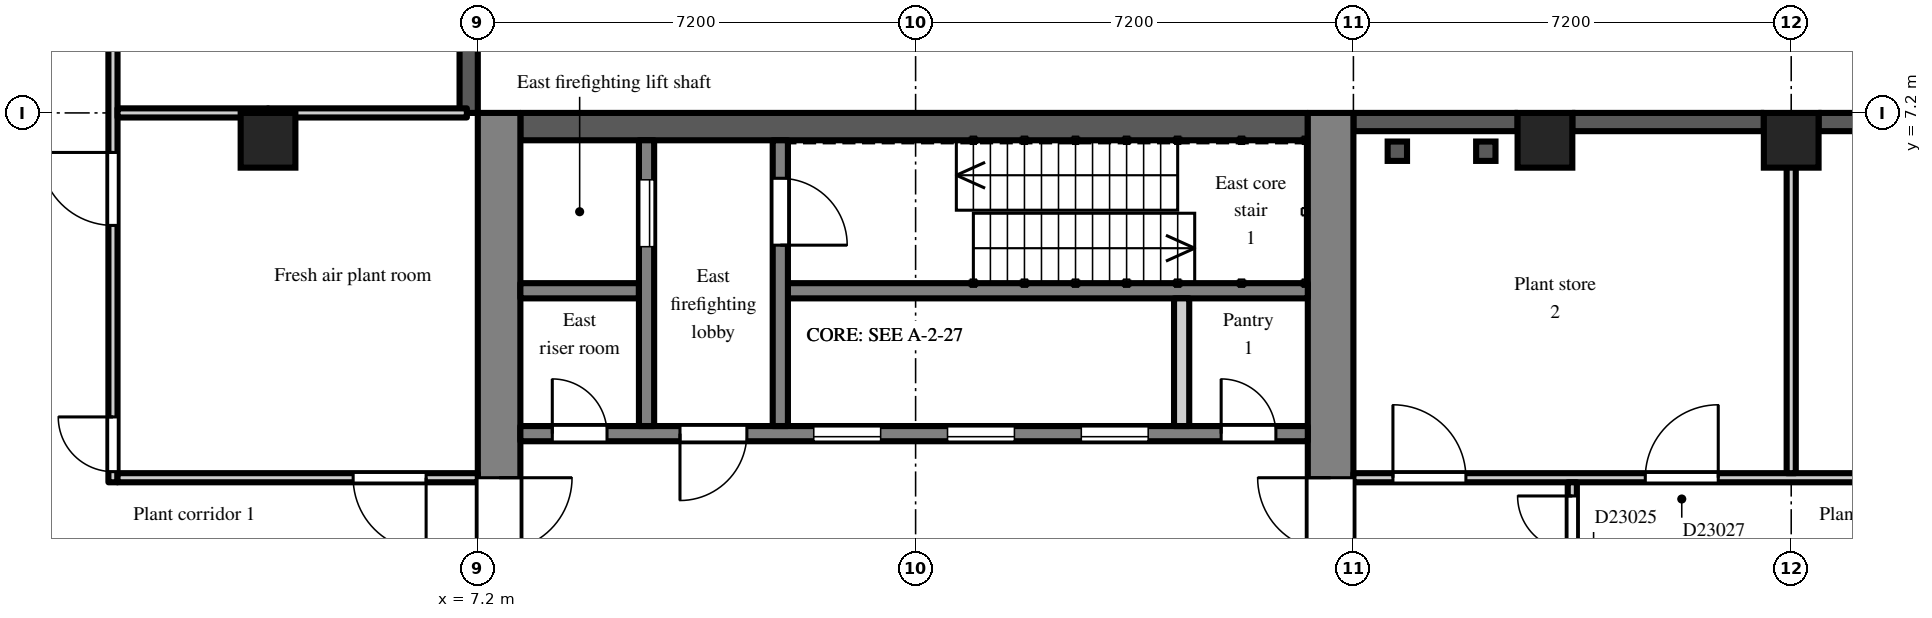
"""IFC4 building model, lengths in metres.
Left out: names, types, materials, properties, quantities, classifications, styles, units other than length and angle.
Written with IfcOpenShell. Run it as: python <this file> out.ifc"""

import sys

from ifc_helpers import new_model, si_unit, direction, frame, frame_2d, origin, origin_2d, place, context, subcontext, project, spatial, polyline, rectangle, outline, extrude, element, fill, save


model = new_model("IFC4")
c1 = context("Model", 3, precision=1e-05, world=origin(), true_north=direction((0.0, 1.0)))
c2 = subcontext(c1, "Body", "Model", "MODEL_VIEW")
j1 = project(units=[si_unit("LENGTHUNIT", "METRE"), si_unit("PLANEANGLEUNIT", "RADIAN")], contexts=[c1])
p1 = place(None, origin())
s1 = spatial("IfcSite", under=j1, at=p1, CompositionType="ELEMENT")
p2 = place(p1, origin())
s2 = spatial("IfcBuilding", under=s1, at=p2, CompositionType="ELEMENT")
p3 = place(p2, frame((0.0, 0.0, 162.3)))
s3 = spatial("IfcBuildingStorey", under=s2, at=p3, CompositionType="ELEMENT", Elevation=162.3)
for number, where, z_axis, x_axis in (
    (1, (3.75, 6.75, 0.0), (0.0, 0.0, 1.0), (1.0, 0.0, 0.0)),
    (2, (24.75, 6.75, 0.0), (0.0, 0.0, 1.0), (1.0, 0.0, 0.0)),
    (3, (28.8, 6.75, 0.0), (0.0, 0.0, 1.0), (1.0, 0.0, 0.0)),
):
    element("IfcColumn", number, at=place(p3, frame(where, z_axis=z_axis, x_axis=x_axis)), inside=s3, PredefinedType="COLUMN", context=c2, shape_type="SweptSolid", body=[
        extrude(rectangle(XDim=0.9, YDim=0.9, at=origin_2d()), origin(), (0.0, 0.0, 1.0), 4.2),
    ])
p4 = place(p3, frame((35.55, 7.05, 0.0), z_axis=(0.0, 0.0, 1.0), x_axis=(-1.0, 0.0, 0.0)))
e4 = element("IfcWall", 4, at=p4, inside=s3, PredefinedType="SOLIDWALL", context=c2, shape_type="SweptSolid", body=[
    extrude(outline(polyline([(0.0, 0.0), (6.3, 0.0), (6.3, 3.8), (5.152, 3.8), (5.15, 3.4), (4.35, 3.4), (4.348, 3.8), (0.0, 3.8), (0.0, 0.0)])), frame((0.0, 0.15, 0.0), z_axis=(0.0, -1.0, 0.0), x_axis=(1.0, 0.0, 0.0)), (0.0, 0.0, 1.0), 0.3),
])
p5 = place(p3, frame((28.35, 7.05, 0.0), z_axis=(0.0, 0.0, 1.0), x_axis=(-1.0, 0.0, 0.0)))
e5 = element("IfcWall", 5, at=p5, inside=s3, PredefinedType="SOLIDWALL", context=c2, shape_type="SweptSolid", body=[
    extrude(rectangle(XDim=3.15, YDim=0.3, at=frame_2d((1.575, 0.0))), origin(), (0.0, 0.0, 1.0), 3.8),
])
p6 = place(p3, frame((24.3, 7.05, 0.0), z_axis=(0.0, 0.0, 1.0), x_axis=(-1.0, 0.0, 0.0)))
e6 = element("IfcWall", 6, at=p6, inside=s3, PredefinedType="SOLIDWALL", context=c2, shape_type="SweptSolid", body=[
    extrude(rectangle(XDim=2.7, YDim=0.3, at=frame_2d((1.35, 0.0))), origin(), (0.0, 0.0, 1.0), 3.4),
])
p7 = place(p3, frame((7.05, 7.2, 0.0), z_axis=(0.0, 0.0, 1.0), x_axis=(0.0, 1.0, 0.0)))
e7 = element("IfcWall", 7, at=p7, inside=s3, PredefinedType="SOLIDWALL", context=c2, shape_type="SweptSolid", body=[
    extrude(rectangle(XDim=7.2, YDim=0.3, at=frame_2d((3.6, 0.0))), origin(), (0.0, 0.0, 1.0), 3.8),
])
p8 = place(p3, frame((7.55, -7.2, 0.0), z_axis=(0.0, 0.0, 1.0), x_axis=(0.0, 1.0, 0.0)))
e8 = element("IfcWall", 8, at=p8, inside=s3, PredefinedType="SHEAR", context=c2, shape_type="SweptSolid", body=[
    extrude(rectangle(XDim=14.4, YDim=0.7, at=frame_2d((7.2, 0.0))), origin(), (0.0, 0.0, 1.0), 3.8),
])
p9 = place(p8, frame((6.0, 0.0, 0.0)))
e9 = element("IfcOpeningElement", 9, at=p9, cuts=e8, PredefinedType="OPENING", context=c2, shape_type="SweptSolid", body=[
    extrude(rectangle(XDim=2.4, YDim=2.2, at=frame_2d((1.2, 1.1))), frame((0.0, 0.36, 0.0), z_axis=(0.0, -1.0, 0.0), x_axis=(1.0, 0.0, 0.0)), (0.0, 0.0, 1.0), 0.72),
])
p10 = place(p3, frame((21.225, -7.2, 0.0), z_axis=(0.0, 0.0, 1.0), x_axis=(0.0, 1.0, 0.0)))
e10 = element("IfcWall", 10, at=p10, inside=s3, PredefinedType="SHEAR", context=c2, shape_type="SweptSolid", body=[
    extrude(rectangle(XDim=14.4, YDim=0.75, at=frame_2d((7.2, 0.0))), origin(), (0.0, 0.0, 1.0), 3.8),
])
p11 = place(p10, frame((6.0, 0.0, 0.0)))
e11 = element("IfcOpeningElement", 11, at=p11, cuts=e10, PredefinedType="OPENING", context=c2, shape_type="SweptSolid", body=[
    extrude(rectangle(XDim=2.4, YDim=2.2, at=frame_2d((1.2, 1.1))), frame((0.0, 0.385, 0.0), z_axis=(0.0, -1.0, 0.0), x_axis=(1.0, 0.0, 0.0)), (0.0, 0.0, 1.0), 0.77),
])
p12 = place(p3, frame((7.9, 6.975, 0.0), z_axis=(0.0, 0.0, 1.0), x_axis=(1.0, 0.0, 0.0)))
e12 = element("IfcWall", 12, at=p12, inside=s3, PredefinedType="SHEAR", context=c2, shape_type="SweptSolid", body=[
    extrude(rectangle(XDim=12.95, YDim=0.45, at=frame_2d((6.475, 0.0))), origin(), (0.0, 0.0, 1.0), 3.8),
])
p13 = place(p3, frame((7.9, 1.925, 0.0), z_axis=(0.0, 0.0, 1.0), x_axis=(1.0, 0.0, 0.0)))
e13 = element("IfcWall", 13, at=p13, inside=s3, PredefinedType="SHEAR", context=c2, shape_type="SweptSolid", body=[
    extrude(rectangle(XDim=12.95, YDim=0.25, at=frame_2d((6.475, 0.0))), origin(), (0.0, 0.0, 1.0), 3.8),
])
p14 = place(p13, frame((4.825, 0.0, 0.0)))
e14 = element("IfcOpeningElement", 14, at=p14, cuts=e13, PredefinedType="OPENING", context=c2, shape_type="SweptSolid", body=[
    extrude(rectangle(XDim=1.1, YDim=2.1, at=frame_2d((0.55, 1.05))), frame((0.0, 0.135, 0.0), z_axis=(0.0, -1.0, 0.0), x_axis=(1.0, 0.0, 0.0)), (0.0, 0.0, 1.0), 0.27),
])
p15 = place(p13, frame((7.025, 0.0, 0.0)))
e15 = element("IfcOpeningElement", 15, at=p15, cuts=e13, PredefinedType="OPENING", context=c2, shape_type="SweptSolid", body=[
    extrude(rectangle(XDim=1.1, YDim=2.1, at=frame_2d((0.55, 1.05))), frame((0.0, 0.135, 0.0), z_axis=(0.0, -1.0, 0.0), x_axis=(1.0, 0.0, 0.0)), (0.0, 0.0, 1.0), 0.27),
])
p16 = place(p13, frame((9.225, 0.0, 0.0)))
e16 = element("IfcOpeningElement", 16, at=p16, cuts=e13, PredefinedType="OPENING", context=c2, shape_type="SweptSolid", body=[
    extrude(rectangle(XDim=1.1, YDim=2.1, at=frame_2d((0.55, 1.05))), frame((0.0, 0.135, 0.0), z_axis=(0.0, -1.0, 0.0), x_axis=(1.0, 0.0, 0.0)), (0.0, 0.0, 1.0), 0.27),
])
p17 = place(p13, frame((0.525, 0.0, 0.0)))
e17 = element("IfcOpeningElement", 17, at=p17, cuts=e13, PredefinedType="OPENING", context=c2, shape_type="SweptSolid", body=[
    extrude(rectangle(XDim=0.9, YDim=2.1, at=frame_2d((0.45, 1.05))), frame((0.0, 0.135, 0.0), z_axis=(0.0, -1.0, 0.0), x_axis=(1.0, 0.0, 0.0)), (0.0, 0.0, 1.0), 0.27),
])
p18 = place(p13, frame((2.625, 0.0, 0.0)))
e18 = element("IfcOpeningElement", 18, at=p18, cuts=e13, PredefinedType="OPENING", context=c2, shape_type="SweptSolid", body=[
    extrude(rectangle(XDim=1.1, YDim=2.1, at=frame_2d((0.55, 1.05))), frame((0.0, 0.135, 0.0), z_axis=(0.0, -1.0, 0.0), x_axis=(1.0, 0.0, 0.0)), (0.0, 0.0, 1.0), 0.27),
])
p19 = place(p13, frame((11.525, 0.0, 0.0)))
e19 = element("IfcOpeningElement", 19, at=p19, cuts=e13, PredefinedType="OPENING", context=c2, shape_type="SweptSolid", body=[
    extrude(rectangle(XDim=0.9, YDim=2.1, at=frame_2d((0.45, 1.05))), frame((0.0, 0.135, 0.0), z_axis=(0.0, -1.0, 0.0), x_axis=(1.0, 0.0, 0.0)), (0.0, 0.0, 1.0), 0.27),
])
p20 = place(p3, frame((7.9, 4.275, 0.0), z_axis=(0.0, 0.0, 1.0), x_axis=(1.0, 0.0, 0.0)))
e20 = element("IfcWall", 20, at=p20, inside=s3, PredefinedType="SHEAR", context=c2, shape_type="SweptSolid", body=[
    extrude(rectangle(XDim=1.95, YDim=0.25, at=frame_2d((0.975, 0.0))), origin(), (0.0, 0.0, 1.0), 3.8),
])
p21 = place(p3, frame((12.3, 4.275, 0.0), z_axis=(0.0, 0.0, 1.0), x_axis=(1.0, 0.0, 0.0)))
e21 = element("IfcWall", 21, at=p21, inside=s3, PredefinedType="SHEAR", context=c2, shape_type="SweptSolid", body=[
    extrude(rectangle(XDim=8.55, YDim=0.25, at=frame_2d((4.275, 0.0))), origin(), (0.0, 0.0, 1.0), 3.8),
])
p22 = place(p3, frame((9.975, 2.05, 0.0), z_axis=(0.0, 0.0, 1.0), x_axis=(0.0, 1.0, 0.0)))
e22 = element("IfcWall", 22, at=p22, inside=s3, PredefinedType="SHEAR", context=c2, shape_type="SweptSolid", body=[
    extrude(rectangle(XDim=4.7, YDim=0.25, at=frame_2d((2.35, 0.0))), origin(), (0.0, 0.0, 1.0), 3.8),
])
p23 = place(p22, frame((2.95, 0.0, 0.0)))
e23 = element("IfcOpeningElement", 23, at=p23, cuts=e22, PredefinedType="OPENING", context=c2, shape_type="SweptSolid", body=[
    extrude(rectangle(XDim=1.1, YDim=2.1, at=frame_2d((0.55, 1.05))), frame((0.0, 0.135, 0.0), z_axis=(0.0, -1.0, 0.0), x_axis=(1.0, 0.0, 0.0)), (0.0, 0.0, 1.0), 0.27),
])
p24 = place(p3, frame((12.175, 2.05, 0.0), z_axis=(0.0, 0.0, 1.0), x_axis=(0.0, 1.0, 0.0)))
e24 = element("IfcWall", 24, at=p24, inside=s3, PredefinedType="SHEAR", context=c2, shape_type="SweptSolid", body=[
    extrude(rectangle(XDim=4.7, YDim=0.25, at=frame_2d((2.35, 0.0))), origin(), (0.0, 0.0, 1.0), 3.8),
])
p25 = place(p24, frame((2.975, 0.0, 0.0)))
e25 = element("IfcOpeningElement", 25, at=p25, cuts=e24, PredefinedType="OPENING", context=c2, shape_type="SweptSolid", body=[
    extrude(rectangle(XDim=1.1, YDim=2.1, at=frame_2d((0.55, 1.05))), frame((0.0, 0.135, 0.0), z_axis=(0.0, -1.0, 0.0), x_axis=(1.0, 0.0, 0.0)), (0.0, 0.0, 1.0), 0.27),
])
p26 = place(p3, frame((18.775, 2.05, 0.0), z_axis=(0.0, 0.0, 1.0), x_axis=(0.0, 1.0, 0.0)))
e26 = element("IfcWall", 26, at=p26, inside=s3, PredefinedType="PARTITIONING", context=c2, shape_type="SweptSolid", body=[
    extrude(rectangle(XDim=2.1, YDim=0.25, at=frame_2d((1.05, 0.0))), origin(), (0.0, 0.0, 1.0), 3.8),
])
p27 = place(p3, frame((1.2, 1.125, 0.0), z_axis=(0.0, 0.0, 1.0), x_axis=(0.0, 1.0, 0.0)))
e27 = element("IfcWall", 27, at=p27, inside=s3, PredefinedType="PARTITIONING", context=c2, shape_type="SweptSolid", body=[
    extrude(rectangle(XDim=20.295, YDim=0.15, at=frame_2d((10.147, 0.0))), origin(), (0.0, 0.0, 1.0), 3.8),
])
p28 = place(p27, frame((0.175, 0.0, 0.0)))
e28 = element("IfcOpeningElement", 28, at=p28, cuts=e27, PredefinedType="OPENING", context=c2, shape_type="SweptSolid", body=[
    extrude(rectangle(XDim=0.9, YDim=2.1, at=frame_2d((0.45, 1.05))), frame((0.0, 0.085, 0.0), z_axis=(0.0, -1.0, 0.0), x_axis=(1.0, 0.0, 0.0)), (0.0, 0.0, 1.0), 0.17),
])
p29 = place(p27, frame((4.225, 0.0, 0.0)))
e29 = element("IfcOpeningElement", 29, at=p29, cuts=e27, PredefinedType="OPENING", context=c2, shape_type="SweptSolid", body=[
    extrude(rectangle(XDim=1.2, YDim=2.1, at=frame_2d((0.6, 1.05))), frame((0.0, 0.085, 0.0), z_axis=(0.0, -1.0, 0.0), x_axis=(1.0, 0.0, 0.0)), (0.0, 0.0, 1.0), 0.17),
])
p30 = place(p27, frame((8.775, 0.0, 0.0)))
e30 = element("IfcOpeningElement", 30, at=p30, cuts=e27, PredefinedType="OPENING", context=c2, shape_type="SweptSolid", body=[
    extrude(rectangle(XDim=1.8, YDim=2.1, at=frame_2d((0.9, 1.05))), frame((0.0, 0.085, 0.0), z_axis=(0.0, -1.0, 0.0), x_axis=(1.0, 0.0, 0.0)), (0.0, 0.0, 1.0), 0.17),
])
p31 = place(p27, frame((15.825, 0.0, 0.0)))
e31 = element("IfcOpeningElement", 31, at=p31, cuts=e27, PredefinedType="OPENING", context=c2, shape_type="SweptSolid", body=[
    extrude(rectangle(XDim=1.8, YDim=2.1, at=frame_2d((0.9, 1.05))), frame((0.0, 0.085, 0.0), z_axis=(0.0, -1.0, 0.0), x_axis=(1.0, 0.0, 0.0)), (0.0, 0.0, 1.0), 0.17),
])
p32 = place(p27, frame((18.325, 0.0, 0.0)))
e32 = element("IfcOpeningElement", 32, at=p32, cuts=e27, PredefinedType="OPENING", context=c2, shape_type="SweptSolid", body=[
    extrude(rectangle(XDim=1.2, YDim=2.1, at=frame_2d((0.6, 1.05))), frame((0.0, 0.085, 0.0), z_axis=(0.0, -1.0, 0.0), x_axis=(1.0, 0.0, 0.0)), (0.0, 0.0, 1.0), 0.17),
])
p33 = place(p3, frame((1.275, 1.2, 0.0), z_axis=(0.0, 0.0, 1.0), x_axis=(1.0, 0.0, 0.0)))
e33 = element("IfcWall", 33, at=p33, inside=s3, PredefinedType="PARTITIONING", context=c2, shape_type="SweptSolid", body=[
    extrude(rectangle(XDim=5.925, YDim=0.15, at=frame_2d((2.962, 0.0))), origin(), (0.0, 0.0, 1.0), 3.8),
])
p34 = place(p33, frame((3.875, 0.0, 0.0)))
e34 = element("IfcOpeningElement", 34, at=p34, cuts=e33, PredefinedType="OPENING", context=c2, shape_type="SweptSolid", body=[
    extrude(rectangle(XDim=1.2, YDim=2.1, at=frame_2d((0.6, 1.05))), frame((0.0, 0.085, 0.0), z_axis=(0.0, -1.0, 0.0), x_axis=(1.0, 0.0, 0.0)), (0.0, 0.0, 1.0), 0.17),
])
p35 = place(p3, frame((1.275, 7.2, 0.0), z_axis=(0.0, 0.0, 1.0), x_axis=(1.0, 0.0, 0.0)))
e35 = element("IfcWall", 35, at=p35, inside=s3, PredefinedType="PARTITIONING", context=c2, shape_type="SweptSolid", body=[
    extrude(rectangle(XDim=2.475, YDim=0.15, at=frame_2d((1.238, 0.0))), origin(), (0.0, 0.0, 1.0), 3.8),
])
p36 = place(p3, frame((21.6, 1.2, 0.0), z_axis=(0.0, 0.0, 1.0), x_axis=(1.0, 0.0, 0.0)))
e36 = element("IfcWall", 36, at=p36, inside=s3, PredefinedType="PARTITIONING", context=c2, shape_type="SweptSolid", body=[
    extrude(outline(polyline([(0.0, 0.0), (14.9, 0.0), (14.9, 3.8), (9.602, 3.8), (9.6, 3.4), (8.8, 3.4), (8.798, 3.8), (0.0, 3.8), (0.0, 0.0)])), frame((0.0, 0.075, 0.0), z_axis=(0.0, -1.0, 0.0), x_axis=(1.0, 0.0, 0.0)), (0.0, 0.0, 1.0), 0.15),
])
p37 = place(p36, frame((0.65, 0.0, 0.0)))
e37 = element("IfcOpeningElement", 37, at=p37, cuts=e36, PredefinedType="OPENING", context=c2, shape_type="SweptSolid", body=[
    extrude(rectangle(XDim=1.2, YDim=2.1, at=frame_2d((0.6, 1.05))), frame((0.0, 0.085, 0.0), z_axis=(0.0, -1.0, 0.0), x_axis=(1.0, 0.0, 0.0)), (0.0, 0.0, 1.0), 0.17),
])
p38 = place(p36, frame((4.8, 0.0, 0.0)))
e38 = element("IfcOpeningElement", 38, at=p38, cuts=e36, PredefinedType="OPENING", context=c2, shape_type="SweptSolid", body=[
    extrude(rectangle(XDim=1.2, YDim=2.1, at=frame_2d((0.6, 1.05))), frame((0.0, 0.085, 0.0), z_axis=(0.0, -1.0, 0.0), x_axis=(1.0, 0.0, 0.0)), (0.0, 0.0, 1.0), 0.17),
])
p39 = place(p36, frame((10.15, 0.0, 0.0)))
e39 = element("IfcOpeningElement", 39, at=p39, cuts=e36, PredefinedType="OPENING", context=c2, shape_type="SweptSolid", body=[
    extrude(rectangle(XDim=1.8, YDim=2.1, at=frame_2d((0.9, 1.05))), frame((0.0, 0.085, 0.0), z_axis=(0.0, -1.0, 0.0), x_axis=(1.0, 0.0, 0.0)), (0.0, 0.0, 1.0), 0.17),
])
p40 = place(p3, frame((25.2, -1.125, 0.0), z_axis=(0.0, 0.0, 1.0), x_axis=(0.0, 1.0, 0.0)))
e40 = element("IfcWall", 40, at=p40, inside=s3, PredefinedType="PARTITIONING", context=c2, shape_type="SweptSolid", body=[
    extrude(rectangle(XDim=2.25, YDim=0.15, at=frame_2d((1.125, 0.0))), origin(), (0.0, 0.0, 1.0), 3.8),
])
p41 = place(p40, frame((0.225, 0.0, 0.0)))
e41 = element("IfcOpeningElement", 41, at=p41, cuts=e40, PredefinedType="OPENING", context=c2, shape_type="SweptSolid", body=[
    extrude(rectangle(XDim=1.8, YDim=2.1, at=frame_2d((0.9, 1.05))), frame((0.0, 0.085, 0.0), z_axis=(0.0, -1.0, 0.0), x_axis=(1.0, 0.0, 0.0)), (0.0, 0.0, 1.0), 0.17),
])
p42 = place(p3, frame((28.8, 1.275, 0.0), z_axis=(0.0, 0.0, 1.0), x_axis=(0.0, 1.0, 0.0)))
e42 = element("IfcWall", 42, at=p42, inside=s3, PredefinedType="PARTITIONING", context=c2, shape_type="SweptSolid", body=[
    extrude(rectangle(XDim=5.625, YDim=0.15, at=frame_2d((2.812, 0.0))), origin(), (0.0, 0.0, 1.0), 2.3),
])
p43 = place(p3, frame((3.75, 7.2, 0.0), z_axis=(0.0, 0.0, 1.0), x_axis=(1.0, 0.0, 0.0)))
e43 = element("IfcWall", 43, at=p43, inside=s3, PredefinedType="PARTITIONING", context=c2, shape_type="SweptSolid", body=[
    extrude(rectangle(XDim=3.27, YDim=0.15, at=frame_2d((1.635, 0.0))), origin(), (0.0, 0.0, 1.0), 3.4),
])
p44 = place(p14, origin())
e44 = element("IfcDoor", 44, at=p44, inside=s3, OperationType="SLIDING_TO_LEFT", PredefinedType="DOOR", context=c2, shape_type="SweptSolid", body=[
    extrude(rectangle(XDim=1.1, YDim=2.1, at=frame_2d((0.55, 1.05))), frame((0.0, 0.025, 0.0), z_axis=(0.0, -1.0, 0.0), x_axis=(1.0, 0.0, 0.0)), (0.0, 0.0, 1.0), 0.05),
])
fill(e14, e44)
p45 = place(p15, origin())
e45 = element("IfcDoor", 45, at=p45, inside=s3, OperationType="SLIDING_TO_LEFT", PredefinedType="DOOR", context=c2, shape_type="SweptSolid", body=[
    extrude(rectangle(XDim=1.1, YDim=2.1, at=frame_2d((0.55, 1.05))), frame((0.0, 0.025, 0.0), z_axis=(0.0, -1.0, 0.0), x_axis=(1.0, 0.0, 0.0)), (0.0, 0.0, 1.0), 0.05),
])
fill(e15, e45)
p46 = place(p16, origin())
e46 = element("IfcDoor", 46, at=p46, inside=s3, OperationType="SLIDING_TO_LEFT", PredefinedType="DOOR", context=c2, shape_type="SweptSolid", body=[
    extrude(rectangle(XDim=1.1, YDim=2.1, at=frame_2d((0.55, 1.05))), frame((0.0, 0.025, 0.0), z_axis=(0.0, -1.0, 0.0), x_axis=(1.0, 0.0, 0.0)), (0.0, 0.0, 1.0), 0.05),
])
fill(e16, e46)
p47 = place(p23, origin())
e47 = element("IfcDoor", 47, at=p47, inside=s3, OperationType="SLIDING_TO_LEFT", PredefinedType="DOOR", context=c2, shape_type="SweptSolid", body=[
    extrude(rectangle(XDim=1.1, YDim=2.1, at=frame_2d((0.55, 1.05))), frame((0.0, 0.025, 0.0), z_axis=(0.0, -1.0, 0.0), x_axis=(1.0, 0.0, 0.0)), (0.0, 0.0, 1.0), 0.05),
])
fill(e23, e47)
p48 = place(p25, frame((1.1, 0.0, 0.0), z_axis=(0.0, 0.0, 1.0), x_axis=(-1.0, 0.0, 0.0)))
e48 = element("IfcDoor", 48, at=p48, inside=s3, OperationType="SINGLE_SWING_RIGHT", PredefinedType="DOOR", context=c2, shape_type="SweptSolid", body=[
    extrude(rectangle(XDim=1.1, YDim=2.1, at=frame_2d((0.55, 1.05))), frame((0.0, 0.025, 0.0), z_axis=(0.0, -1.0, 0.0), x_axis=(1.0, 0.0, 0.0)), (0.0, 0.0, 1.0), 0.05),
])
fill(e25, e48)
p49 = place(p17, origin())
e49 = element("IfcDoor", 49, at=p49, inside=s3, OperationType="SINGLE_SWING_LEFT", PredefinedType="DOOR", context=c2, shape_type="SweptSolid", body=[
    extrude(rectangle(XDim=0.9, YDim=2.1, at=frame_2d((0.45, 1.05))), frame((0.0, 0.025, 0.0), z_axis=(0.0, -1.0, 0.0), x_axis=(1.0, 0.0, 0.0)), (0.0, 0.0, 1.0), 0.05),
])
fill(e17, e49)
p50 = place(p18, frame((1.1, 0.0, 0.0), z_axis=(0.0, 0.0, 1.0), x_axis=(-1.0, 0.0, 0.0)))
e50 = element("IfcDoor", 50, at=p50, inside=s3, OperationType="SINGLE_SWING_RIGHT", PredefinedType="DOOR", context=c2, shape_type="SweptSolid", body=[
    extrude(rectangle(XDim=1.1, YDim=2.1, at=frame_2d((0.55, 1.05))), frame((0.0, 0.025, 0.0), z_axis=(0.0, -1.0, 0.0), x_axis=(1.0, 0.0, 0.0)), (0.0, 0.0, 1.0), 0.05),
])
fill(e18, e50)
p51 = place(p9, frame((2.4, 0.0, 0.0), z_axis=(0.0, 0.0, 1.0), x_axis=(-1.0, 0.0, 0.0)))
e51 = element("IfcDoor", 51, at=p51, inside=s3, OperationType="DOUBLE_DOOR_DOUBLE_SWING", PredefinedType="DOOR", context=c2, shape_type="SweptSolid", body=[
    extrude(rectangle(XDim=2.4, YDim=2.2, at=frame_2d((1.2, 1.1))), frame((0.0, 0.025, 0.0), z_axis=(0.0, -1.0, 0.0), x_axis=(1.0, 0.0, 0.0)), (0.0, 0.0, 1.0), 0.05),
])
fill(e9, e51)
p52 = place(p11, origin())
e52 = element("IfcDoor", 52, at=p52, inside=s3, OperationType="DOUBLE_DOOR_DOUBLE_SWING", PredefinedType="DOOR", context=c2, shape_type="SweptSolid", body=[
    extrude(rectangle(XDim=2.4, YDim=2.2, at=frame_2d((1.2, 1.1))), frame((0.0, 0.025, 0.0), z_axis=(0.0, -1.0, 0.0), x_axis=(1.0, 0.0, 0.0)), (0.0, 0.0, 1.0), 0.05),
])
fill(e11, e52)
p53 = place(p19, origin())
e53 = element("IfcDoor", 53, at=p53, inside=s3, OperationType="SINGLE_SWING_LEFT", PredefinedType="DOOR", context=c2, shape_type="SweptSolid", body=[
    extrude(rectangle(XDim=0.9, YDim=2.1, at=frame_2d((0.45, 1.05))), frame((0.0, 0.025, 0.0), z_axis=(0.0, -1.0, 0.0), x_axis=(1.0, 0.0, 0.0)), (0.0, 0.0, 1.0), 0.05),
])
fill(e19, e53)
p54 = place(p28, origin())
e54 = element("IfcDoor", 54, at=p54, inside=s3, OperationType="SINGLE_SWING_RIGHT", PredefinedType="DOOR", context=c2, shape_type="SweptSolid", body=[
    extrude(rectangle(XDim=0.9, YDim=2.1, at=frame_2d((0.45, 1.05))), frame((0.0, 0.025, 0.0), z_axis=(0.0, -1.0, 0.0), x_axis=(1.0, 0.0, 0.0)), (0.0, 0.0, 1.0), 0.05),
])
fill(e28, e54)
p55 = place(p29, origin())
e55 = element("IfcDoor", 55, at=p55, inside=s3, OperationType="SINGLE_SWING_RIGHT", PredefinedType="DOOR", context=c2, shape_type="SweptSolid", body=[
    extrude(rectangle(XDim=1.2, YDim=2.1, at=frame_2d((0.6, 1.05))), frame((0.0, 0.025, 0.0), z_axis=(0.0, -1.0, 0.0), x_axis=(1.0, 0.0, 0.0)), (0.0, 0.0, 1.0), 0.05),
])
fill(e29, e55)
p56 = place(p34, frame((1.2, 0.0, 0.0), z_axis=(0.0, 0.0, 1.0), x_axis=(-1.0, 0.0, 0.0)))
e56 = element("IfcDoor", 56, at=p56, inside=s3, OperationType="SINGLE_SWING_LEFT", PredefinedType="DOOR", context=c2, shape_type="SweptSolid", body=[
    extrude(rectangle(XDim=1.2, YDim=2.1, at=frame_2d((0.6, 1.05))), frame((0.0, 0.025, 0.0), z_axis=(0.0, -1.0, 0.0), x_axis=(1.0, 0.0, 0.0)), (0.0, 0.0, 1.0), 0.05),
])
fill(e34, e56)
p57 = place(p41, origin())
e57 = element("IfcDoor", 57, at=p57, inside=s3, OperationType="DOUBLE_DOOR_DOUBLE_SWING", PredefinedType="DOOR", context=c2, shape_type="SweptSolid", body=[
    extrude(rectangle(XDim=1.8, YDim=2.1, at=frame_2d((0.9, 1.05))), frame((0.0, 0.025, 0.0), z_axis=(0.0, -1.0, 0.0), x_axis=(1.0, 0.0, 0.0)), (0.0, 0.0, 1.0), 0.05),
])
fill(e41, e57)
p58 = place(p37, origin())
e58 = element("IfcDoor", 58, at=p58, inside=s3, OperationType="SINGLE_SWING_LEFT", PredefinedType="DOOR", context=c2, shape_type="SweptSolid", body=[
    extrude(rectangle(XDim=1.2, YDim=2.1, at=frame_2d((0.6, 1.05))), frame((0.0, 0.025, 0.0), z_axis=(0.0, -1.0, 0.0), x_axis=(1.0, 0.0, 0.0)), (0.0, 0.0, 1.0), 0.05),
])
fill(e37, e58)
p59 = place(p38, origin())
e59 = element("IfcDoor", 59, at=p59, inside=s3, OperationType="SINGLE_SWING_RIGHT", PredefinedType="DOOR", context=c2, shape_type="SweptSolid", body=[
    extrude(rectangle(XDim=1.2, YDim=2.1, at=frame_2d((0.6, 1.05))), frame((0.0, 0.025, 0.0), z_axis=(0.0, -1.0, 0.0), x_axis=(1.0, 0.0, 0.0)), (0.0, 0.0, 1.0), 0.05),
])
fill(e38, e59)
save(model, sys.argv[1])
